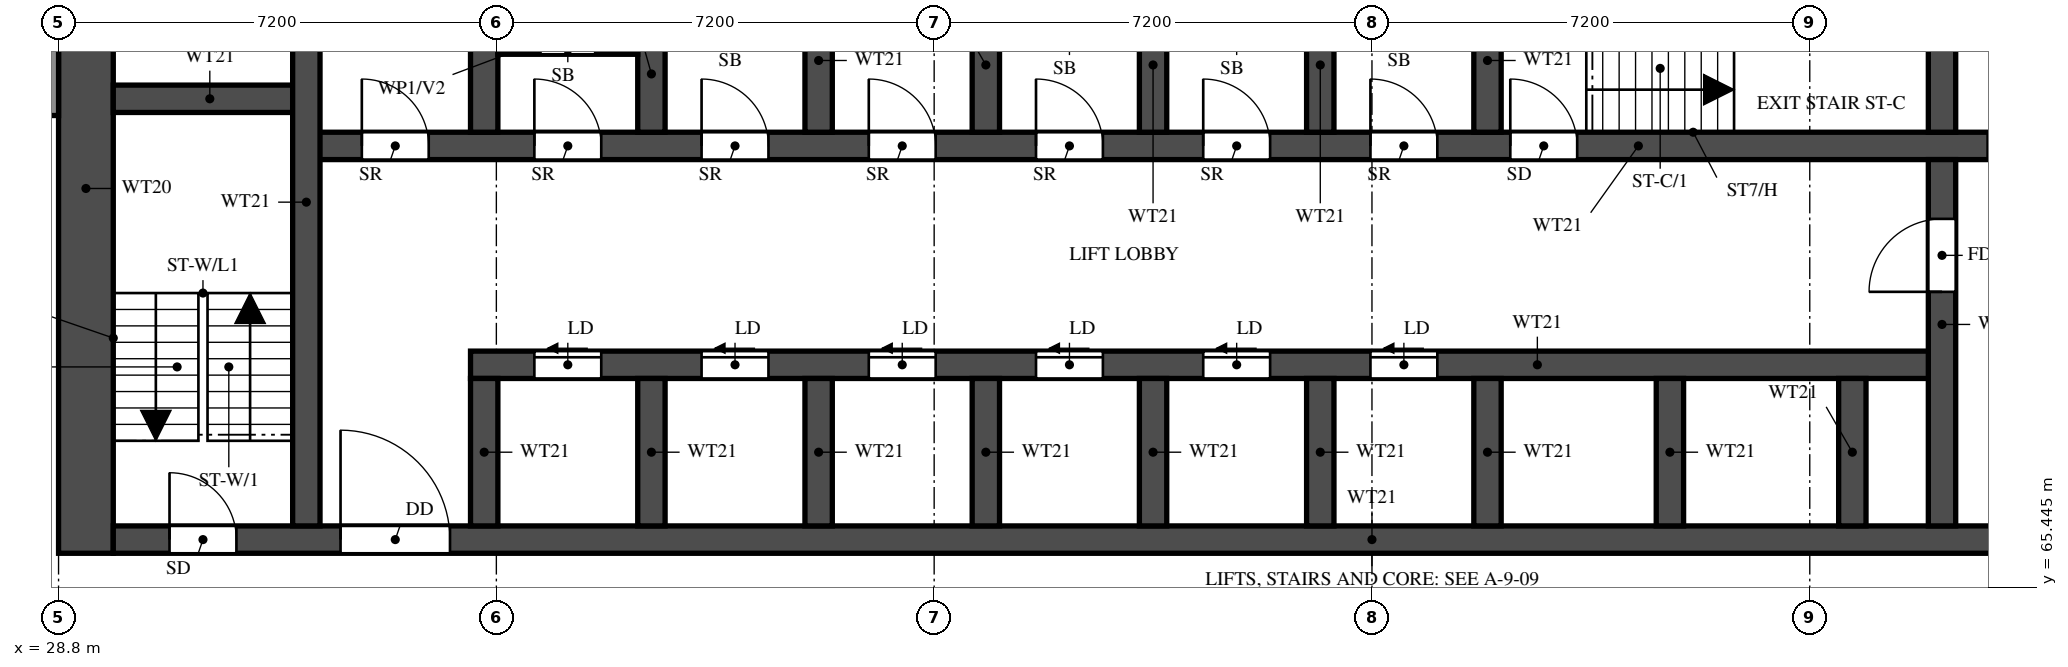
"""IFC4 building model, lengths in metres.
Left out: names, types, materials, properties, quantities, classifications, styles, units other than length and angle.
Written with IfcOpenShell. Run it as: python <this file> out.ifc"""

import sys

from ifc_helpers import new_model, si_unit, direction, frame, frame_2d, origin, place, context, subcontext, project, spatial, rectangle, extrude, element, fill, save


model = new_model("IFC4")
c1 = context("Model", 3, precision=1e-05, world=origin(), true_north=direction((0.0, 1.0)))
c2 = subcontext(c1, "Body", "Model", "MODEL_VIEW")
j1 = project(units=[si_unit("LENGTHUNIT", "METRE"), si_unit("PLANEANGLEUNIT", "RADIAN")], contexts=[c1])
p1 = place(None, origin())
s1 = spatial("IfcSite", under=j1, at=p1, CompositionType="ELEMENT")
p2 = place(p1, origin())
s2 = spatial("IfcBuilding", under=s1, at=p2, CompositionType="ELEMENT")
p3 = place(p2, frame((0.0, 0.0, 44.5)))
s3 = spatial("IfcBuildingStorey", under=s2, at=p3, CompositionType="ELEMENT", Elevation=44.5)
p4 = place(p3, frame((29.25, 66.0, 0.0), z_axis=(0.0, 0.0, 1.0), x_axis=(0.0, 1.0, 0.0)))
e1 = element("IfcWall", 1, at=p4, inside=s3, PredefinedType="SHEAR", context=c2, shape_type="SweptSolid", body=[
    extrude(rectangle(XDim=12.0, YDim=0.9, at=frame_2d((6.0, 0.0))), origin(), (0.0, 0.0, 1.0), 3.18),
])
p5 = place(p3, frame((29.7, 66.225, 0.0), z_axis=(0.0, 0.0, 1.0), x_axis=(1.0, 0.0, 0.0)))
e2 = element("IfcWall", 2, at=p5, inside=s3, PredefinedType="SHEAR", context=c2, shape_type="SweptSolid", body=[
    extrude(rectangle(XDim=41.4, YDim=0.45, at=frame_2d((20.7, 0.0))), origin(), (0.0, 0.0, 1.0), 3.18),
])
p6 = place(p5, frame((0.925, 0.0, 0.0)))
e3 = element("IfcOpeningElement", 3, at=p6, cuts=e2, PredefinedType="OPENING", context=c2, shape_type="SweptSolid", body=[
    extrude(rectangle(XDim=1.1, YDim=2.1, at=frame_2d((0.55, 1.05))), frame((0.0, 0.235, 0.0), z_axis=(0.0, -1.0, 0.0), x_axis=(1.0, 0.0, 0.0)), (0.0, 0.0, 1.0), 0.47),
])
p7 = place(p5, frame((3.738, 0.0, 0.0)))
e4 = element("IfcOpeningElement", 4, at=p7, cuts=e2, PredefinedType="OPENING", context=c2, shape_type="SweptSolid", body=[
    extrude(rectangle(XDim=1.8, YDim=2.1, at=frame_2d((0.9, 1.05))), frame((0.0, 0.235, 0.0), z_axis=(0.0, -1.0, 0.0), x_axis=(1.0, 0.0, 0.0)), (0.0, 0.0, 1.0), 0.47),
])
p8 = place(p3, frame((35.575, 69.1, 0.0), z_axis=(0.0, 0.0, 1.0), x_axis=(1.0, 0.0, 0.0)))
e5 = element("IfcWall", 5, at=p8, inside=s3, PredefinedType="SHEAR", context=c2, shape_type="SweptSolid", body=[
    extrude(rectangle(XDim=24.2, YDim=0.45, at=frame_2d((12.1, 0.0))), origin(), (0.0, 0.0, 1.0), 3.18),
])
p9 = place(p8, frame((1.05, 0.0, 0.0)))
e6 = element("IfcOpeningElement", 6, at=p9, cuts=e5, PredefinedType="OPENING", context=c2, shape_type="SweptSolid", body=[
    extrude(rectangle(XDim=1.1, YDim=2.1, at=frame_2d((0.55, 1.05))), frame((0.0, 0.235, 0.0), z_axis=(0.0, -1.0, 0.0), x_axis=(1.0, 0.0, 0.0)), (0.0, 0.0, 1.0), 0.47),
])
p10 = place(p8, frame((3.8, 0.0, 0.0)))
e7 = element("IfcOpeningElement", 7, at=p10, cuts=e5, PredefinedType="OPENING", context=c2, shape_type="SweptSolid", body=[
    extrude(rectangle(XDim=1.1, YDim=2.1, at=frame_2d((0.55, 1.05))), frame((0.0, 0.235, 0.0), z_axis=(0.0, -1.0, 0.0), x_axis=(1.0, 0.0, 0.0)), (0.0, 0.0, 1.0), 0.47),
])
p11 = place(p8, frame((6.55, 0.0, 0.0)))
e8 = element("IfcOpeningElement", 8, at=p11, cuts=e5, PredefinedType="OPENING", context=c2, shape_type="SweptSolid", body=[
    extrude(rectangle(XDim=1.1, YDim=2.1, at=frame_2d((0.55, 1.05))), frame((0.0, 0.235, 0.0), z_axis=(0.0, -1.0, 0.0), x_axis=(1.0, 0.0, 0.0)), (0.0, 0.0, 1.0), 0.47),
])
p12 = place(p8, frame((9.3, 0.0, 0.0)))
e9 = element("IfcOpeningElement", 9, at=p12, cuts=e5, PredefinedType="OPENING", context=c2, shape_type="SweptSolid", body=[
    extrude(rectangle(XDim=1.1, YDim=2.1, at=frame_2d((0.55, 1.05))), frame((0.0, 0.235, 0.0), z_axis=(0.0, -1.0, 0.0), x_axis=(1.0, 0.0, 0.0)), (0.0, 0.0, 1.0), 0.47),
])
p13 = place(p8, frame((12.05, 0.0, 0.0)))
e10 = element("IfcOpeningElement", 10, at=p13, cuts=e5, PredefinedType="OPENING", context=c2, shape_type="SweptSolid", body=[
    extrude(rectangle(XDim=1.1, YDim=2.1, at=frame_2d((0.55, 1.05))), frame((0.0, 0.235, 0.0), z_axis=(0.0, -1.0, 0.0), x_axis=(1.0, 0.0, 0.0)), (0.0, 0.0, 1.0), 0.47),
])
p14 = place(p8, frame((14.8, 0.0, 0.0)))
e11 = element("IfcOpeningElement", 11, at=p14, cuts=e5, PredefinedType="OPENING", context=c2, shape_type="SweptSolid", body=[
    extrude(rectangle(XDim=1.1, YDim=2.1, at=frame_2d((0.55, 1.05))), frame((0.0, 0.235, 0.0), z_axis=(0.0, -1.0, 0.0), x_axis=(1.0, 0.0, 0.0)), (0.0, 0.0, 1.0), 0.47),
])
p15 = place(p3, frame((32.875, 72.7, 0.0), z_axis=(0.0, 0.0, 1.0), x_axis=(1.0, 0.0, 0.0)))
e12 = element("IfcWall", 12, at=p15, inside=s3, PredefinedType="SHEAR", context=c2, shape_type="SweptSolid", body=[
    extrude(rectangle(XDim=35.05, YDim=0.45, at=frame_2d((17.525, 0.0))), origin(), (0.0, 0.0, 1.0), 3.18),
])
p16 = place(p15, frame((19.8, 0.0, 0.0)))
e13 = element("IfcOpeningElement", 13, at=p16, cuts=e12, PredefinedType="OPENING", context=c2, shape_type="SweptSolid", body=[
    extrude(rectangle(XDim=1.1, YDim=2.1, at=frame_2d((0.55, 1.05))), frame((0.0, 0.235, 0.0), z_axis=(0.0, -1.0, 0.0), x_axis=(1.0, 0.0, 0.0)), (0.0, 0.0, 1.0), 0.47),
])
p17 = place(p15, frame((27.65, 0.0, 0.0)))
e14 = element("IfcOpeningElement", 14, at=p17, cuts=e12, PredefinedType="OPENING", context=c2, shape_type="SweptSolid", body=[
    extrude(rectangle(XDim=1.1, YDim=2.1, at=frame_2d((0.55, 1.05))), frame((0.0, 0.235, 0.0), z_axis=(0.0, -1.0, 0.0), x_axis=(1.0, 0.0, 0.0)), (0.0, 0.0, 1.0), 0.47),
])
p18 = place(p15, frame((30.25, 0.0, 0.0)))
e15 = element("IfcOpeningElement", 15, at=p18, cuts=e12, PredefinedType="OPENING", context=c2, shape_type="SweptSolid", body=[
    extrude(rectangle(XDim=1.1, YDim=2.1, at=frame_2d((0.55, 1.05))), frame((0.0, 0.235, 0.0), z_axis=(0.0, -1.0, 0.0), x_axis=(1.0, 0.0, 0.0)), (0.0, 0.0, 1.0), 0.47),
])
p19 = place(p15, frame((3.75, 0.0, 0.0)))
e16 = element("IfcOpeningElement", 16, at=p19, cuts=e12, PredefinedType="OPENING", context=c2, shape_type="SweptSolid", body=[
    extrude(rectangle(XDim=1.1, YDim=2.1, at=frame_2d((0.55, 1.05))), frame((0.0, 0.235, 0.0), z_axis=(0.0, -1.0, 0.0), x_axis=(1.0, 0.0, 0.0)), (0.0, 0.0, 1.0), 0.47),
])
p20 = place(p15, frame((6.5, 0.0, 0.0)))
e17 = element("IfcOpeningElement", 17, at=p20, cuts=e12, PredefinedType="OPENING", context=c2, shape_type="SweptSolid", body=[
    extrude(rectangle(XDim=1.1, YDim=2.1, at=frame_2d((0.55, 1.05))), frame((0.0, 0.235, 0.0), z_axis=(0.0, -1.0, 0.0), x_axis=(1.0, 0.0, 0.0)), (0.0, 0.0, 1.0), 0.47),
])
p21 = place(p15, frame((9.25, 0.0, 0.0)))
e18 = element("IfcOpeningElement", 18, at=p21, cuts=e12, PredefinedType="OPENING", context=c2, shape_type="SweptSolid", body=[
    extrude(rectangle(XDim=1.1, YDim=2.1, at=frame_2d((0.55, 1.05))), frame((0.0, 0.235, 0.0), z_axis=(0.0, -1.0, 0.0), x_axis=(1.0, 0.0, 0.0)), (0.0, 0.0, 1.0), 0.47),
])
p22 = place(p15, frame((12.0, 0.0, 0.0)))
e19 = element("IfcOpeningElement", 19, at=p22, cuts=e12, PredefinedType="OPENING", context=c2, shape_type="SweptSolid", body=[
    extrude(rectangle(XDim=1.1, YDim=2.1, at=frame_2d((0.55, 1.05))), frame((0.0, 0.235, 0.0), z_axis=(0.0, -1.0, 0.0), x_axis=(1.0, 0.0, 0.0)), (0.0, 0.0, 1.0), 0.47),
])
p23 = place(p15, frame((14.75, 0.0, 0.0)))
e20 = element("IfcOpeningElement", 20, at=p23, cuts=e12, PredefinedType="OPENING", context=c2, shape_type="SweptSolid", body=[
    extrude(rectangle(XDim=1.1, YDim=2.1, at=frame_2d((0.55, 1.05))), frame((0.0, 0.235, 0.0), z_axis=(0.0, -1.0, 0.0), x_axis=(1.0, 0.0, 0.0)), (0.0, 0.0, 1.0), 0.47),
])
p24 = place(p15, frame((17.5, 0.0, 0.0)))
e21 = element("IfcOpeningElement", 21, at=p24, cuts=e12, PredefinedType="OPENING", context=c2, shape_type="SweptSolid", body=[
    extrude(rectangle(XDim=1.1, YDim=2.1, at=frame_2d((0.55, 1.05))), frame((0.0, 0.235, 0.0), z_axis=(0.0, -1.0, 0.0), x_axis=(1.0, 0.0, 0.0)), (0.0, 0.0, 1.0), 0.47),
])
p25 = place(p15, frame((0.913, 0.0, 0.0)))
e22 = element("IfcOpeningElement", 22, at=p25, cuts=e12, PredefinedType="OPENING", context=c2, shape_type="SweptSolid", body=[
    extrude(rectangle(XDim=1.1, YDim=2.1, at=frame_2d((0.55, 1.05))), frame((0.0, 0.235, 0.0), z_axis=(0.0, -1.0, 0.0), x_axis=(1.0, 0.0, 0.0)), (0.0, 0.0, 1.0), 0.47),
])
p26 = place(p3, frame((29.7, 73.475, 0.0), z_axis=(0.0, 0.0, 1.0), x_axis=(1.0, 0.0, 0.0)))
e23 = element("IfcWall", 23, at=p26, inside=s3, PredefinedType="SHEAR", context=c2, shape_type="SweptSolid", body=[
    extrude(rectangle(XDim=3.175, YDim=0.45, at=frame_2d((1.587, 0.0))), origin(), (0.0, 0.0, 1.0), 3.18),
])
p27 = place(p3, frame((32.875, 66.45, 0.0), z_axis=(0.0, 0.0, 1.0), x_axis=(0.0, 1.0, 0.0)))
e24 = element("IfcWall", 24, at=p27, inside=s3, PredefinedType="SHEAR", context=c2, shape_type="SweptSolid", body=[
    extrude(rectangle(XDim=10.65, YDim=0.45, at=frame_2d((5.325, 0.0))), origin(), (0.0, 0.0, 1.0), 3.18),
])
p28 = place(p3, frame((59.775, 66.45, 0.0), z_axis=(0.0, 0.0, 1.0), x_axis=(0.0, 1.0, 0.0)))
e25 = element("IfcWall", 25, at=p28, inside=s3, PredefinedType="SHEAR", context=c2, shape_type="SweptSolid", body=[
    extrude(rectangle(XDim=6.025, YDim=0.45, at=frame_2d((3.013, 0.0))), origin(), (0.0, 0.0, 1.0), 3.18),
])
p29 = place(p28, frame((3.85, 0.0, 0.0)))
e26 = element("IfcOpeningElement", 26, at=p29, cuts=e25, PredefinedType="OPENING", context=c2, shape_type="SweptSolid", body=[
    extrude(rectangle(XDim=1.2, YDim=2.1, at=frame_2d((0.6, 1.05))), frame((0.0, 0.235, 0.0), z_axis=(0.0, -1.0, 0.0), x_axis=(1.0, 0.0, 0.0)), (0.0, 0.0, 1.0), 0.47),
])
p30 = place(p3, frame((59.775, 72.925, 0.0), z_axis=(0.0, 0.0, 1.0), x_axis=(0.0, 1.0, 0.0)))
e27 = element("IfcWall", 27, at=p30, inside=s3, PredefinedType="SHEAR", context=c2, shape_type="SweptSolid", body=[
    extrude(rectangle(XDim=2.95, YDim=0.45, at=frame_2d((1.475, 0.0))), origin(), (0.0, 0.0, 1.0), 3.18),
])
for number, where, z_axis, x_axis in (
    (28, (35.8, 66.45, 0.0), (0.0, 0.0, 1.0), (0.0, 1.0, 0.0)),
    (29, (38.55, 66.45, 0.0), (0.0, 0.0, 1.0), (0.0, 1.0, 0.0)),
    (30, (41.3, 66.45, 0.0), (0.0, 0.0, 1.0), (0.0, 1.0, 0.0)),
    (31, (44.05, 66.45, 0.0), (0.0, 0.0, 1.0), (0.0, 1.0, 0.0)),
    (32, (46.8, 66.45, 0.0), (0.0, 0.0, 1.0), (0.0, 1.0, 0.0)),
    (33, (49.55, 66.45, 0.0), (0.0, 0.0, 1.0), (0.0, 1.0, 0.0)),
    (34, (52.3, 66.45, 0.0), (0.0, 0.0, 1.0), (0.0, 1.0, 0.0)),
    (35, (55.3, 66.45, 0.0), (0.0, 0.0, 1.0), (0.0, 1.0, 0.0)),
    (36, (58.3, 66.45, 0.0), (0.0, 0.0, 1.0), (0.0, 1.0, 0.0)),
):
    element("IfcWall", number, at=place(p3, frame(where, z_axis=z_axis, x_axis=x_axis)), inside=s3, PredefinedType="SHEAR", context=c2, shape_type="SweptSolid", body=[
        extrude(rectangle(XDim=2.425, YDim=0.45, at=frame_2d((1.212, 0.0))), origin(), (0.0, 0.0, 1.0), 3.18),
    ])
for number, where, z_axis, x_axis in (
    (37, (35.8, 72.925, 0.0), (0.0, 0.0, 1.0), (0.0, 1.0, 0.0)),
    (38, (38.55, 72.925, 0.0), (0.0, 0.0, 1.0), (0.0, 1.0, 0.0)),
    (39, (41.3, 72.925, 0.0), (0.0, 0.0, 1.0), (0.0, 1.0, 0.0)),
    (40, (44.05, 72.925, 0.0), (0.0, 0.0, 1.0), (0.0, 1.0, 0.0)),
    (41, (46.8, 72.925, 0.0), (0.0, 0.0, 1.0), (0.0, 1.0, 0.0)),
    (42, (49.55, 72.925, 0.0), (0.0, 0.0, 1.0), (0.0, 1.0, 0.0)),
    (43, (52.3, 72.925, 0.0), (0.0, 0.0, 1.0), (0.0, 1.0, 0.0)),
):
    element("IfcWall", number, at=place(p3, frame(where, z_axis=z_axis, x_axis=x_axis)), inside=s3, PredefinedType="SHEAR", context=c2, shape_type="SweptSolid", body=[
        extrude(rectangle(XDim=2.95, YDim=0.45, at=frame_2d((1.475, 0.0))), origin(), (0.0, 0.0, 1.0), 3.18),
    ])
p31 = place(p3, frame((36.025, 74.282, 0.0), z_axis=(0.0, 0.0, 1.0), x_axis=(1.0, 0.0, 0.0)))
e44 = element("IfcWall", 44, at=p31, inside=s3, PredefinedType="PARTITIONING", context=c2, shape_type="SweptSolid", body=[
    extrude(rectangle(XDim=2.3, YDim=0.15, at=frame_2d((1.15, 0.0))), origin(), (0.0, 0.0, 1.0), 3.18),
])
p32 = place(p31, frame((0.7, 0.0, 0.0)))
e45 = element("IfcOpeningElement", 45, at=p32, cuts=e44, PredefinedType="OPENING", context=c2, shape_type="SweptSolid", body=[
    extrude(rectangle(XDim=0.9, YDim=2.1, at=frame_2d((0.45, 1.05))), frame((0.0, 0.085, 0.0), z_axis=(0.0, -1.0, 0.0), x_axis=(1.0, 0.0, 0.0)), (0.0, 0.0, 1.0), 0.17),
])
p33 = place(p3, frame((28.7, 73.2, 0.0), z_axis=(0.0, 0.0, 1.0), x_axis=(0.0, 1.0, 0.0)))
e46 = element("IfcWall", 46, at=p33, inside=s3, PredefinedType="SOLIDWALL", context=c2, shape_type="SweptSolid", body=[
    extrude(rectangle(XDim=4.8, YDim=0.2, at=frame_2d((2.4, 0.0))), origin(), (0.0, 0.0, 1.0), 3.18),
])
p34 = place(p6, origin())
e47 = element("IfcDoor", 47, at=p34, inside=s3, OperationType="SINGLE_SWING_LEFT", PredefinedType="DOOR", context=c2, shape_type="SweptSolid", body=[
    extrude(rectangle(XDim=1.1, YDim=2.1, at=frame_2d((0.55, 1.05))), frame((0.0, 0.025, 0.0), z_axis=(0.0, -1.0, 0.0), x_axis=(1.0, 0.0, 0.0)), (0.0, 0.0, 1.0), 0.05),
])
fill(e3, e47)
p35 = place(p16, origin())
e48 = element("IfcDoor", 48, at=p35, inside=s3, OperationType="SINGLE_SWING_LEFT", PredefinedType="DOOR", context=c2, shape_type="SweptSolid", body=[
    extrude(rectangle(XDim=1.1, YDim=2.1, at=frame_2d((0.55, 1.05))), frame((0.0, 0.025, 0.0), z_axis=(0.0, -1.0, 0.0), x_axis=(1.0, 0.0, 0.0)), (0.0, 0.0, 1.0), 0.05),
])
fill(e13, e48)
p36 = place(p7, origin())
e49 = element("IfcDoor", 49, at=p36, inside=s3, OperationType="DOUBLE_DOOR_SINGLE_SWING", PredefinedType="DOOR", context=c2, shape_type="SweptSolid", body=[
    extrude(rectangle(XDim=1.8, YDim=2.1, at=frame_2d((0.9, 1.05))), frame((0.0, 0.025, 0.0), z_axis=(0.0, -1.0, 0.0), x_axis=(1.0, 0.0, 0.0)), (0.0, 0.0, 1.0), 0.05),
])
fill(e4, e49)
p37 = place(p29, origin())
e50 = element("IfcDoor", 50, at=p37, inside=s3, OperationType="SINGLE_SWING_RIGHT", PredefinedType="DOOR", context=c2, shape_type="SweptSolid", body=[
    extrude(rectangle(XDim=1.2, YDim=2.1, at=frame_2d((0.6, 1.05))), frame((0.0, 0.025, 0.0), z_axis=(0.0, -1.0, 0.0), x_axis=(1.0, 0.0, 0.0)), (0.0, 0.0, 1.0), 0.05),
])
fill(e26, e50)
p38 = place(p17, origin())
e51 = element("IfcDoor", 51, at=p38, inside=s3, OperationType="SLIDING_TO_LEFT", PredefinedType="DOOR", context=c2, shape_type="SweptSolid", body=[
    extrude(rectangle(XDim=1.1, YDim=2.1, at=frame_2d((0.55, 1.05))), frame((0.0, 0.025, 0.0), z_axis=(0.0, -1.0, 0.0), x_axis=(1.0, 0.0, 0.0)), (0.0, 0.0, 1.0), 0.05),
])
fill(e14, e51)
p39 = place(p9, origin())
e52 = element("IfcDoor", 52, at=p39, inside=s3, OperationType="SLIDING_TO_LEFT", PredefinedType="DOOR", context=c2, shape_type="SweptSolid", body=[
    extrude(rectangle(XDim=1.1, YDim=2.1, at=frame_2d((0.55, 1.05))), frame((0.0, 0.025, 0.0), z_axis=(0.0, -1.0, 0.0), x_axis=(1.0, 0.0, 0.0)), (0.0, 0.0, 1.0), 0.05),
])
fill(e6, e52)
p40 = place(p10, origin())
e53 = element("IfcDoor", 53, at=p40, inside=s3, OperationType="SLIDING_TO_LEFT", PredefinedType="DOOR", context=c2, shape_type="SweptSolid", body=[
    extrude(rectangle(XDim=1.1, YDim=2.1, at=frame_2d((0.55, 1.05))), frame((0.0, 0.025, 0.0), z_axis=(0.0, -1.0, 0.0), x_axis=(1.0, 0.0, 0.0)), (0.0, 0.0, 1.0), 0.05),
])
fill(e7, e53)
p41 = place(p11, origin())
e54 = element("IfcDoor", 54, at=p41, inside=s3, OperationType="SLIDING_TO_LEFT", PredefinedType="DOOR", context=c2, shape_type="SweptSolid", body=[
    extrude(rectangle(XDim=1.1, YDim=2.1, at=frame_2d((0.55, 1.05))), frame((0.0, 0.025, 0.0), z_axis=(0.0, -1.0, 0.0), x_axis=(1.0, 0.0, 0.0)), (0.0, 0.0, 1.0), 0.05),
])
fill(e8, e54)
p42 = place(p12, origin())
e55 = element("IfcDoor", 55, at=p42, inside=s3, OperationType="SLIDING_TO_LEFT", PredefinedType="DOOR", context=c2, shape_type="SweptSolid", body=[
    extrude(rectangle(XDim=1.1, YDim=2.1, at=frame_2d((0.55, 1.05))), frame((0.0, 0.025, 0.0), z_axis=(0.0, -1.0, 0.0), x_axis=(1.0, 0.0, 0.0)), (0.0, 0.0, 1.0), 0.05),
])
fill(e9, e55)
p43 = place(p13, origin())
e56 = element("IfcDoor", 56, at=p43, inside=s3, OperationType="SLIDING_TO_LEFT", PredefinedType="DOOR", context=c2, shape_type="SweptSolid", body=[
    extrude(rectangle(XDim=1.1, YDim=2.1, at=frame_2d((0.55, 1.05))), frame((0.0, 0.025, 0.0), z_axis=(0.0, -1.0, 0.0), x_axis=(1.0, 0.0, 0.0)), (0.0, 0.0, 1.0), 0.05),
])
fill(e10, e56)
p44 = place(p14, origin())
e57 = element("IfcDoor", 57, at=p44, inside=s3, OperationType="SLIDING_TO_LEFT", PredefinedType="DOOR", context=c2, shape_type="SweptSolid", body=[
    extrude(rectangle(XDim=1.1, YDim=2.1, at=frame_2d((0.55, 1.05))), frame((0.0, 0.025, 0.0), z_axis=(0.0, -1.0, 0.0), x_axis=(1.0, 0.0, 0.0)), (0.0, 0.0, 1.0), 0.05),
])
fill(e11, e57)
p45 = place(p19, origin())
e58 = element("IfcDoor", 58, at=p45, inside=s3, OperationType="SINGLE_SWING_LEFT", PredefinedType="DOOR", context=c2, shape_type="SweptSolid", body=[
    extrude(rectangle(XDim=1.1, YDim=2.1, at=frame_2d((0.55, 1.05))), frame((0.0, 0.025, 0.0), z_axis=(0.0, -1.0, 0.0), x_axis=(1.0, 0.0, 0.0)), (0.0, 0.0, 1.0), 0.05),
])
fill(e16, e58)
p46 = place(p20, origin())
e59 = element("IfcDoor", 59, at=p46, inside=s3, OperationType="SINGLE_SWING_LEFT", PredefinedType="DOOR", context=c2, shape_type="SweptSolid", body=[
    extrude(rectangle(XDim=1.1, YDim=2.1, at=frame_2d((0.55, 1.05))), frame((0.0, 0.025, 0.0), z_axis=(0.0, -1.0, 0.0), x_axis=(1.0, 0.0, 0.0)), (0.0, 0.0, 1.0), 0.05),
])
fill(e17, e59)
p47 = place(p21, origin())
e60 = element("IfcDoor", 60, at=p47, inside=s3, OperationType="SINGLE_SWING_LEFT", PredefinedType="DOOR", context=c2, shape_type="SweptSolid", body=[
    extrude(rectangle(XDim=1.1, YDim=2.1, at=frame_2d((0.55, 1.05))), frame((0.0, 0.025, 0.0), z_axis=(0.0, -1.0, 0.0), x_axis=(1.0, 0.0, 0.0)), (0.0, 0.0, 1.0), 0.05),
])
fill(e18, e60)
p48 = place(p22, origin())
e61 = element("IfcDoor", 61, at=p48, inside=s3, OperationType="SINGLE_SWING_LEFT", PredefinedType="DOOR", context=c2, shape_type="SweptSolid", body=[
    extrude(rectangle(XDim=1.1, YDim=2.1, at=frame_2d((0.55, 1.05))), frame((0.0, 0.025, 0.0), z_axis=(0.0, -1.0, 0.0), x_axis=(1.0, 0.0, 0.0)), (0.0, 0.0, 1.0), 0.05),
])
fill(e19, e61)
p49 = place(p23, origin())
e62 = element("IfcDoor", 62, at=p49, inside=s3, OperationType="SINGLE_SWING_LEFT", PredefinedType="DOOR", context=c2, shape_type="SweptSolid", body=[
    extrude(rectangle(XDim=1.1, YDim=2.1, at=frame_2d((0.55, 1.05))), frame((0.0, 0.025, 0.0), z_axis=(0.0, -1.0, 0.0), x_axis=(1.0, 0.0, 0.0)), (0.0, 0.0, 1.0), 0.05),
])
fill(e20, e62)
p50 = place(p24, origin())
e63 = element("IfcDoor", 63, at=p50, inside=s3, OperationType="SINGLE_SWING_LEFT", PredefinedType="DOOR", context=c2, shape_type="SweptSolid", body=[
    extrude(rectangle(XDim=1.1, YDim=2.1, at=frame_2d((0.55, 1.05))), frame((0.0, 0.025, 0.0), z_axis=(0.0, -1.0, 0.0), x_axis=(1.0, 0.0, 0.0)), (0.0, 0.0, 1.0), 0.05),
])
fill(e21, e63)
p51 = place(p25, origin())
e64 = element("IfcDoor", 64, at=p51, inside=s3, OperationType="SINGLE_SWING_LEFT", PredefinedType="DOOR", context=c2, shape_type="SweptSolid", body=[
    extrude(rectangle(XDim=1.1, YDim=2.1, at=frame_2d((0.55, 1.05))), frame((0.0, 0.025, 0.0), z_axis=(0.0, -1.0, 0.0), x_axis=(1.0, 0.0, 0.0)), (0.0, 0.0, 1.0), 0.05),
])
fill(e22, e64)
save(model, sys.argv[1])
